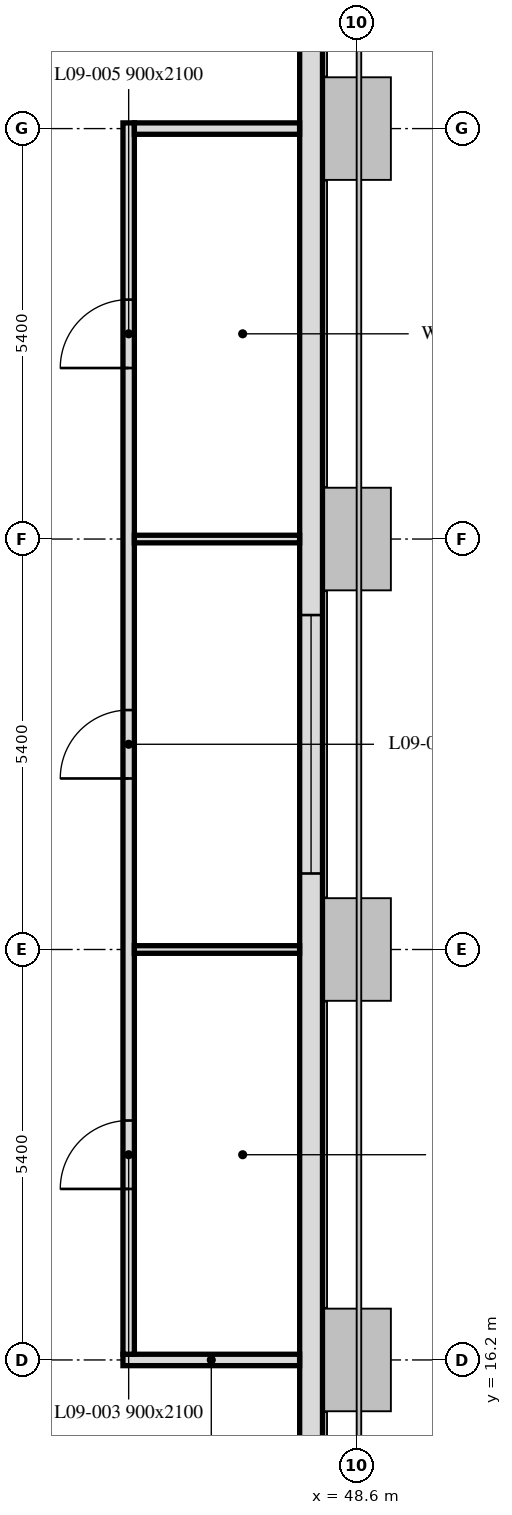
"""IFC4 building model, lengths in metres.
Left out: names, types, materials, properties, quantities, classifications, styles, units other than length and angle.
Written with IfcOpenShell. Run it as: python <this file> out.ifc"""

import sys

from ifc_helpers import new_model, si_unit, direction, frame, frame_2d, origin, place, context, subcontext, project, spatial, rectangle, extrude, element, fill, save


model = new_model("IFC4")
c1 = context("Model", 3, precision=1e-05, world=origin(), true_north=direction((0.0, 1.0)))
c2 = subcontext(c1, "Body", "Model", "MODEL_VIEW")
j1 = project(units=[si_unit("LENGTHUNIT", "METRE"), si_unit("PLANEANGLEUNIT", "RADIAN")], contexts=[c1])
p1 = place(None, origin())
s1 = spatial("IfcSite", under=j1, at=p1, CompositionType="ELEMENT")
p2 = place(p1, origin())
s2 = spatial("IfcBuilding", under=s1, at=p2, CompositionType="ELEMENT")
p3 = place(p2, frame((0.0, 0.0, 45.0)))
s3 = spatial("IfcBuildingStorey", under=s2, at=p3, CompositionType="ELEMENT", Elevation=45.0)
p4 = place(p3, frame((48.0, 5.586, 0.0), z_axis=(0.0, 0.0, 1.0), x_axis=(0.0, 1.0, 0.0)))
e1 = element("IfcWall", 1, at=p4, inside=s3, PredefinedType="SOLIDWALL", context=c2, shape_type="SweptSolid", body=[
    extrude(rectangle(XDim=32.027, YDim=0.3, at=frame_2d((16.014, 0.0))), origin(), (0.0, 0.0, 1.0), 3.5),
])
p5 = place(p4, frame((6.564, 0.0, 0.9)))
e2 = element("IfcOpeningElement", 2, at=p5, cuts=e1, PredefinedType="OPENING", context=c2, shape_type="SweptSolid", body=[
    extrude(rectangle(XDim=1.1, YDim=1.7, at=frame_2d((0.55, 0.85))), frame((0.0, 0.16, 0.0), z_axis=(0.0, -1.0, 0.0), x_axis=(1.0, 0.0, 0.0)), (0.0, 0.0, 1.0), 0.32),
])
p6 = place(p4, frame((8.164, 0.0, 0.9)))
e3 = element("IfcOpeningElement", 3, at=p6, cuts=e1, PredefinedType="OPENING", context=c2, shape_type="SweptSolid", body=[
    extrude(rectangle(XDim=1.1, YDim=1.7, at=frame_2d((0.55, 0.85))), frame((0.0, 0.16, 0.0), z_axis=(0.0, -1.0, 0.0), x_axis=(1.0, 0.0, 0.0)), (0.0, 0.0, 1.0), 0.32),
])
p7 = place(p4, frame((17.014, 0.0, 0.9)))
e4 = element("IfcOpeningElement", 4, at=p7, cuts=e1, PredefinedType="OPENING", context=c2, shape_type="SweptSolid", body=[
    extrude(rectangle(XDim=3.4, YDim=1.7, at=frame_2d((1.7, 0.85))), frame((0.0, 0.16, 0.0), z_axis=(0.0, -1.0, 0.0), x_axis=(1.0, 0.0, 0.0)), (0.0, 0.0, 1.0), 0.32),
])
p8 = place(p4, frame((28.164, 0.0, 0.9)))
e5 = element("IfcOpeningElement", 5, at=p8, cuts=e1, PredefinedType="OPENING", context=c2, shape_type="SweptSolid", body=[
    extrude(rectangle(XDim=1.1, YDim=1.7, at=frame_2d((0.55, 0.85))), frame((0.0, 0.16, 0.0), z_axis=(0.0, -1.0, 0.0), x_axis=(1.0, 0.0, 0.0)), (0.0, 0.0, 1.0), 0.32),
])
p9 = place(p4, frame((29.764, 0.0, 0.9)))
e6 = element("IfcOpeningElement", 6, at=p9, cuts=e1, PredefinedType="OPENING", context=c2, shape_type="SweptSolid", body=[
    extrude(rectangle(XDim=1.1, YDim=1.7, at=frame_2d((0.55, 0.85))), frame((0.0, 0.16, 0.0), z_axis=(0.0, -1.0, 0.0), x_axis=(1.0, 0.0, 0.0)), (0.0, 0.0, 1.0), 0.32),
])
p10 = place(p3, frame((47.849, 16.2, 0.0), z_axis=(0.0, 0.0, 1.0), x_axis=(-1.0, 0.0, 0.0)))
e7 = element("IfcWall", 7, at=p10, inside=s3, PredefinedType="PARTITIONING", context=c2, shape_type="SweptSolid", body=[
    extrude(rectangle(XDim=2.324, YDim=0.15, at=frame_2d((1.162, 0.0))), origin(), (0.0, 0.0, 1.0), 2.75),
])
p11 = place(p3, frame((45.6, 16.275, 0.0), z_axis=(0.0, 0.0, 1.0), x_axis=(0.0, 1.0, 0.0)))
e8 = element("IfcWall", 8, at=p11, inside=s3, PredefinedType="PARTITIONING", context=c2, shape_type="SweptSolid", body=[
    extrude(rectangle(XDim=16.2, YDim=0.15, at=frame_2d((8.1, 0.0))), origin(), (0.0, 0.0, 1.0), 2.75),
])
p12 = place(p11, frame((2.175, 0.0, 0.0)))
e9 = element("IfcOpeningElement", 9, at=p12, cuts=e8, PredefinedType="OPENING", context=c2, shape_type="SweptSolid", body=[
    extrude(rectangle(XDim=0.9, YDim=2.1, at=frame_2d((0.45, 1.05))), frame((0.0, 0.075, 0.0), z_axis=(0.0, -1.0, 0.0), x_axis=(1.0, 0.0, 0.0)), (0.0, 0.0, 1.0), 0.15),
])
p13 = place(p11, frame((7.575, 0.0, 0.0)))
e10 = element("IfcOpeningElement", 10, at=p13, cuts=e8, PredefinedType="OPENING", context=c2, shape_type="SweptSolid", body=[
    extrude(rectangle(XDim=0.9, YDim=2.1, at=frame_2d((0.45, 1.05))), frame((0.0, 0.075, 0.0), z_axis=(0.0, -1.0, 0.0), x_axis=(1.0, 0.0, 0.0)), (0.0, 0.0, 1.0), 0.15),
])
p14 = place(p11, frame((12.975, 0.0, 0.0)))
e11 = element("IfcOpeningElement", 11, at=p14, cuts=e8, PredefinedType="OPENING", context=c2, shape_type="SweptSolid", body=[
    extrude(rectangle(XDim=0.9, YDim=2.1, at=frame_2d((0.45, 1.05))), frame((0.0, 0.075, 0.0), z_axis=(0.0, -1.0, 0.0), x_axis=(1.0, 0.0, 0.0)), (0.0, 0.0, 1.0), 0.15),
])
p15 = place(p3, frame((45.675, 32.4, 0.0), z_axis=(0.0, 0.0, 1.0), x_axis=(1.0, 0.0, 0.0)))
e12 = element("IfcWall", 12, at=p15, inside=s3, PredefinedType="PARTITIONING", context=c2, shape_type="SweptSolid", body=[
    extrude(rectangle(XDim=2.174, YDim=0.15, at=frame_2d((1.087, 0.0))), origin(), (0.0, 0.0, 1.0), 2.75),
])
for number, where, z_axis, x_axis in (
    (13, (47.849, 21.6, 0.0), (0.0, 0.0, 1.0), (-1.0, 0.0, 0.0)),
    (14, (47.849, 27.0, 0.0), (0.0, 0.0, 1.0), (-1.0, 0.0, 0.0)),
):
    element("IfcWall", number, at=place(p3, frame(where, z_axis=z_axis, x_axis=x_axis)), inside=s3, PredefinedType="PARTITIONING", context=c2, shape_type="SweptSolid", body=[
        extrude(rectangle(XDim=2.174, YDim=0.1, at=frame_2d((1.087, 0.0))), origin(), (0.0, 0.0, 1.0), 2.75),
    ])
p16 = place(p7, origin())
e15 = element("IfcWindow", 15, at=p16, inside=s3, PartitioningType="SINGLE_PANEL", PredefinedType="WINDOW", context=c2, shape_type="SweptSolid", body=[
    extrude(rectangle(XDim=3.4, YDim=1.7, at=frame_2d((1.7, 0.85))), frame((0.0, 0.03, 0.0), z_axis=(0.0, -1.0, 0.0), x_axis=(1.0, 0.0, 0.0)), (0.0, 0.0, 1.0), 0.06),
])
fill(e4, e15)
p17 = place(p12, origin())
e16 = element("IfcDoor", 16, at=p17, inside=s3, OperationType="SINGLE_SWING_LEFT", PredefinedType="DOOR", context=c2, shape_type="SweptSolid", body=[
    extrude(rectangle(XDim=0.9, YDim=2.1, at=frame_2d((0.45, 1.05))), frame((0.0, 0.025, 0.0), z_axis=(0.0, -1.0, 0.0), x_axis=(1.0, 0.0, 0.0)), (0.0, 0.0, 1.0), 0.05),
])
fill(e9, e16)
p18 = place(p13, origin())
e17 = element("IfcDoor", 17, at=p18, inside=s3, OperationType="SINGLE_SWING_LEFT", PredefinedType="DOOR", context=c2, shape_type="SweptSolid", body=[
    extrude(rectangle(XDim=0.9, YDim=2.1, at=frame_2d((0.45, 1.05))), frame((0.0, 0.025, 0.0), z_axis=(0.0, -1.0, 0.0), x_axis=(1.0, 0.0, 0.0)), (0.0, 0.0, 1.0), 0.05),
])
fill(e10, e17)
p19 = place(p14, origin())
e18 = element("IfcDoor", 18, at=p19, inside=s3, OperationType="SINGLE_SWING_LEFT", PredefinedType="DOOR", context=c2, shape_type="SweptSolid", body=[
    extrude(rectangle(XDim=0.9, YDim=2.1, at=frame_2d((0.45, 1.05))), frame((0.0, 0.025, 0.0), z_axis=(0.0, -1.0, 0.0), x_axis=(1.0, 0.0, 0.0)), (0.0, 0.0, 1.0), 0.05),
])
fill(e11, e18)
save(model, sys.argv[1])
